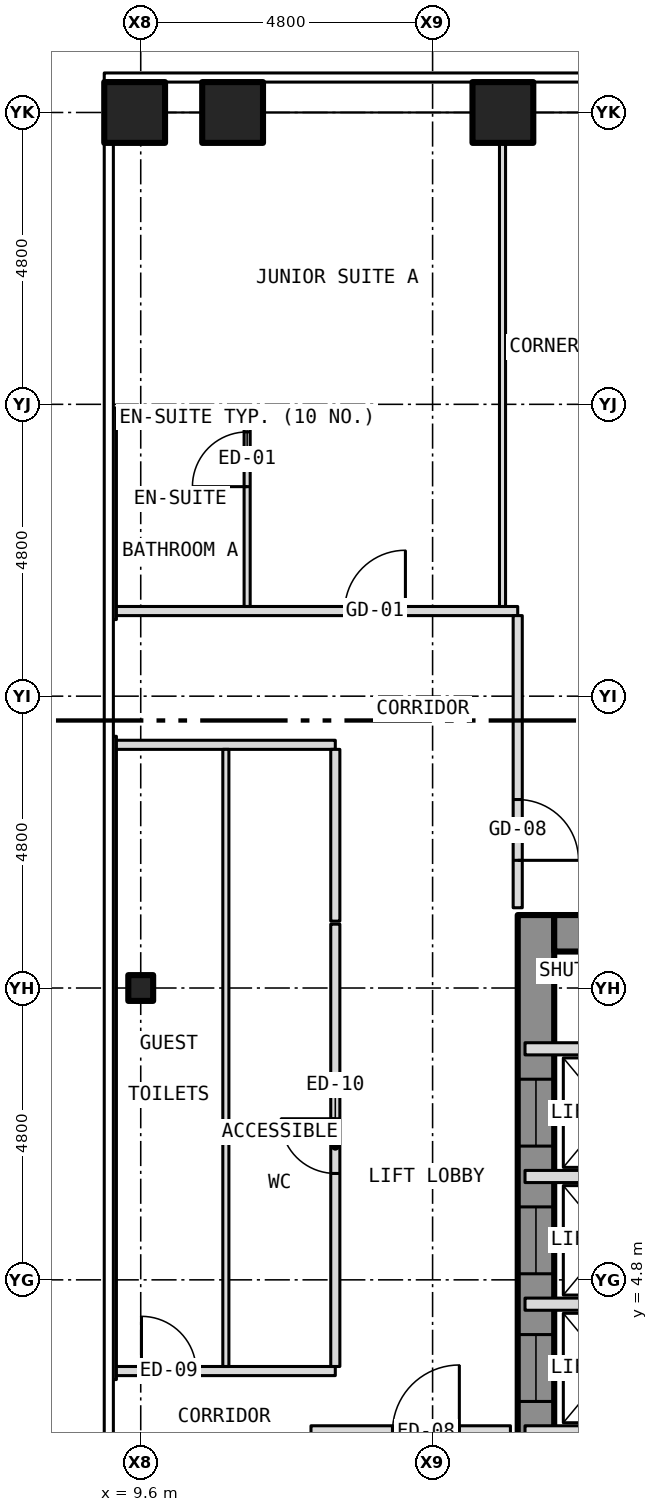
"""IFC4 building model, lengths in metres.
Left out: names, types, materials, properties, quantities, classifications, styles, units other than length and angle.
Written with IfcOpenShell. Run it as: python <this file> out.ifc"""

import sys

from ifc_helpers import new_model, si_unit, direction, frame, frame_2d, origin, origin_2d, place, context, subcontext, project, spatial, rectangle, hollow_rectangle, i_section, extrude, element, fill, save


model = new_model("IFC4")
c1 = context("Model", 3, precision=1e-05, world=origin(), true_north=direction((0.0, 1.0)))
c2 = subcontext(c1, "Body", "Model", "MODEL_VIEW")
j1 = project(units=[si_unit("LENGTHUNIT", "METRE"), si_unit("PLANEANGLEUNIT", "RADIAN")], contexts=[c1])
p1 = place(None, origin())
s1 = spatial("IfcSite", under=j1, at=p1, CompositionType="ELEMENT")
p2 = place(p1, origin())
s2 = spatial("IfcBuilding", under=s1, at=p2, CompositionType="ELEMENT")
p3 = place(p2, frame((0.0, 0.0, 67.0)))
s3 = spatial("IfcBuildingStorey", under=s2, at=p3, CompositionType="ELEMENT", Elevation=67.0)
for number, where, z_axis, x_axis in (
    (1, (11.111, 24.0, -0.15), (0.0, 0.0, 1.0), (1.0, 0.0, 0.0)),
    (2, (15.556, 24.0, -0.15), (0.0, 0.0, 1.0), (1.0, 0.0, 0.0)),
    (3, (9.5, 24.0, -0.15), (0.0, 0.0, 1.0), (1.0, 0.0, 0.0)),
):
    element("IfcColumn", number, at=place(p3, frame(where, z_axis=z_axis, x_axis=x_axis)), inside=s3, PredefinedType="COLUMN", context=c2, shape_type="SweptSolid", body=[
        extrude(hollow_rectangle(XDim=1.0, YDim=1.0, WallThickness=0.06, at=origin_2d()), origin(), (0.0, 0.0, 1.0), 3.5),
    ])
p4 = place(p3, frame((9.6, 9.6, -0.15), z_axis=(0.0, 0.0, 1.0), x_axis=(1.0, 0.0, 0.0)))
e4 = element("IfcColumn", 4, at=p4, inside=s3, PredefinedType="COLUMN", context=c2, shape_type="SweptSolid", body=[
    extrude(i_section(OverallWidth=0.409, OverallDepth=0.424, WebThickness=0.033, FlangeThickness=0.052, at=origin_2d()), origin(), (0.0, 0.0, 1.0), 3.5),
])
p5 = place(p3, frame((16.1, -10.8, 0.0), z_axis=(0.0, 0.0, 1.0), x_axis=(0.0, 1.0, 0.0)))
e5 = element("IfcWall", 5, at=p5, inside=s3, PredefinedType="SHEAR", context=c2, shape_type="SweptSolid", body=[
    extrude(rectangle(XDim=21.6, YDim=0.6, at=frame_2d((10.8, 0.0))), origin(), (0.0, 0.0, 1.0), 3.25),
])
p6 = place(p5, frame((9.4, 0.0, 0.0)))
e6 = element("IfcOpeningElement", 6, at=p6, cuts=e5, PredefinedType="OPENING", context=c2, shape_type="SweptSolid", body=[
    extrude(rectangle(XDim=1.1, YDim=2.1, at=frame_2d((0.55, 1.05))), frame((0.0, 0.312, 0.0), z_axis=(0.0, -1.0, 0.0), x_axis=(1.0, 0.0, 0.0)), (0.0, 0.0, 1.0), 0.624),
])
p7 = place(p5, frame((11.5, 0.0, 0.0)))
e7 = element("IfcOpeningElement", 7, at=p7, cuts=e5, PredefinedType="OPENING", context=c2, shape_type="SweptSolid", body=[
    extrude(rectangle(XDim=1.1, YDim=2.1, at=frame_2d((0.55, 1.05))), frame((0.0, 0.312, 0.0), z_axis=(0.0, -1.0, 0.0), x_axis=(1.0, 0.0, 0.0)), (0.0, 0.0, 1.0), 0.624),
])
p8 = place(p5, frame((13.6, 0.0, 0.0)))
e8 = element("IfcOpeningElement", 8, at=p8, cuts=e5, PredefinedType="OPENING", context=c2, shape_type="SweptSolid", body=[
    extrude(rectangle(XDim=1.1, YDim=2.1, at=frame_2d((0.55, 1.05))), frame((0.0, 0.312, 0.0), z_axis=(0.0, -1.0, 0.0), x_axis=(1.0, 0.0, 0.0)), (0.0, 0.0, 1.0), 0.624),
])
p9 = place(p5, frame((15.7, 0.0, 0.0)))
e9 = element("IfcOpeningElement", 9, at=p9, cuts=e5, PredefinedType="OPENING", context=c2, shape_type="SweptSolid", body=[
    extrude(rectangle(XDim=1.1, YDim=2.1, at=frame_2d((0.55, 1.05))), frame((0.0, 0.312, 0.0), z_axis=(0.0, -1.0, 0.0), x_axis=(1.0, 0.0, 0.0)), (0.0, 0.0, 1.0), 0.624),
])
p10 = place(p5, frame((17.8, 0.0, 0.0)))
e10 = element("IfcOpeningElement", 10, at=p10, cuts=e5, PredefinedType="OPENING", context=c2, shape_type="SweptSolid", body=[
    extrude(rectangle(XDim=1.1, YDim=2.1, at=frame_2d((0.55, 1.05))), frame((0.0, 0.312, 0.0), z_axis=(0.0, -1.0, 0.0), x_axis=(1.0, 0.0, 0.0)), (0.0, 0.0, 1.0), 0.624),
])
p11 = place(p5, frame((5.642, 0.0, 0.0)))
e11 = element("IfcOpeningElement", 11, at=p11, cuts=e5, PredefinedType="OPENING", context=c2, shape_type="SweptSolid", body=[
    extrude(rectangle(XDim=1.1, YDim=2.1, at=frame_2d((0.55, 1.05))), frame((0.0, 0.312, 0.0), z_axis=(0.0, -1.0, 0.0), x_axis=(1.0, 0.0, 0.0)), (0.0, 0.0, 1.0), 0.624),
])
p12 = place(p5, frame((7.5, 0.0, 0.0)))
e12 = element("IfcOpeningElement", 12, at=p12, cuts=e5, PredefinedType="OPENING", context=c2, shape_type="SweptSolid", body=[
    extrude(rectangle(XDim=1.1, YDim=2.1, at=frame_2d((0.55, 1.05))), frame((0.0, 0.312, 0.0), z_axis=(0.0, -1.0, 0.0), x_axis=(1.0, 0.0, 0.0)), (0.0, 0.0, 1.0), 0.624),
])
p13 = place(p3, frame((16.4, 10.5, 0.0), z_axis=(0.0, 0.0, 1.0), x_axis=(1.0, 0.0, 0.0)))
e13 = element("IfcWall", 13, at=p13, inside=s3, PredefinedType="SHEAR", context=c2, shape_type="SweptSolid", body=[
    extrude(rectangle(XDim=7.0, YDim=0.6, at=frame_2d((3.5, 0.0))), origin(), (0.0, 0.0, 1.0), 3.25),
])
p14 = place(p3, frame((12.4, 2.3, 0.0), z_axis=(0.0, 0.0, 1.0), x_axis=(1.0, 0.0, 0.0)))
e14 = element("IfcWall", 14, at=p14, inside=s3, PredefinedType="PARTITIONING", context=c2, shape_type="SweptSolid", body=[
    extrude(rectangle(XDim=3.28, YDim=0.2, at=frame_2d((1.64, 0.0))), origin(), (0.0, 0.0, 1.0), 3.35),
])
p15 = place(p14, frame((1.34, 0.0, 0.0)))
e15 = element("IfcOpeningElement", 15, at=p15, cuts=e14, PredefinedType="OPENING", context=c2, shape_type="SweptSolid", body=[
    extrude(rectangle(XDim=1.1, YDim=2.1, at=frame_2d((0.55, 1.05))), frame((0.0, 0.112, 0.0), z_axis=(0.0, -1.0, 0.0), x_axis=(1.0, 0.0, 0.0)), (0.0, 0.0, 1.0), 0.224),
])
p16 = place(p3, frame((15.92, 2.3, 0.0), z_axis=(0.0, 0.0, 1.0), x_axis=(1.0, 0.0, 0.0)))
e16 = element("IfcWall", 16, at=p16, inside=s3, PredefinedType="PARTITIONING", context=c2, shape_type="SweptSolid", body=[
    extrude(rectangle(XDim=2.88, YDim=0.2, at=frame_2d((1.44, 0.0))), origin(), (0.0, 0.0, 1.0), 3.25),
])
p17 = place(p3, frame((9.15, 3.3, 0.0), z_axis=(0.0, 0.0, 1.0), x_axis=(1.0, 0.0, 0.0)))
e17 = element("IfcWall", 17, at=p17, inside=s3, PredefinedType="PARTITIONING", context=c2, shape_type="SweptSolid", body=[
    extrude(rectangle(XDim=3.65, YDim=0.15, at=frame_2d((1.825, 0.0))), origin(), (0.0, 0.0, 1.0), 3.35),
])
p18 = place(p17, frame((0.462, 0.0, 0.0)))
e18 = element("IfcOpeningElement", 18, at=p18, cuts=e17, PredefinedType="OPENING", context=c2, shape_type="SweptSolid", body=[
    extrude(rectangle(XDim=0.9, YDim=2.1, at=frame_2d((0.45, 1.05))), frame((0.0, 0.087, 0.0), z_axis=(0.0, -1.0, 0.0), x_axis=(1.0, 0.0, 0.0)), (0.0, 0.0, 1.0), 0.174),
])
for number, where, z_axis, x_axis in (
    (19, (15.92, 4.4, 0.0), (0.0, 0.0, 1.0), (1.0, 0.0, 0.0)),
    (20, (15.92, 6.5, 0.0), (0.0, 0.0, 1.0), (1.0, 0.0, 0.0)),
    (21, (15.92, 8.6, 0.0), (0.0, 0.0, 1.0), (1.0, 0.0, 0.0)),
):
    element("IfcWall", number, at=place(p3, frame(where, z_axis=z_axis, x_axis=x_axis)), inside=s3, PredefinedType="PARTITIONING", context=c2, shape_type="SweptSolid", body=[
        extrude(rectangle(XDim=2.88, YDim=0.2, at=frame_2d((1.44, 0.0))), origin(), (0.0, 0.0, 1.0), 3.25),
    ])
p19 = place(p3, frame((9.15, 13.6, 0.0), z_axis=(0.0, 0.0, 1.0), x_axis=(1.0, 0.0, 0.0)))
e22 = element("IfcWall", 22, at=p19, inside=s3, PredefinedType="PARTITIONING", context=c2, shape_type="SweptSolid", body=[
    extrude(rectangle(XDim=3.65, YDim=0.15, at=frame_2d((1.825, 0.0))), origin(), (0.0, 0.0, 1.0), 3.35),
])
p20 = place(p3, frame((9.15, 15.8, 0.0), z_axis=(0.0, 0.0, 1.0), x_axis=(1.0, 0.0, 0.0)))
e23 = element("IfcWall", 23, at=p20, inside=s3, PredefinedType="PARTITIONING", context=c2, shape_type="SweptSolid", body=[
    extrude(rectangle(XDim=6.65, YDim=0.15, at=frame_2d((3.325, 0.0))), origin(), (0.0, 0.0, 1.0), 3.35),
])
p21 = place(p20, frame((3.803, 0.0, 0.0)))
e24 = element("IfcOpeningElement", 24, at=p21, cuts=e23, PredefinedType="OPENING", context=c2, shape_type="SweptSolid", body=[
    extrude(rectangle(XDim=1.0, YDim=2.1, at=frame_2d((0.5, 1.05))), frame((0.0, 0.087, 0.0), z_axis=(0.0, -1.0, 0.0), x_axis=(1.0, 0.0, 0.0)), (0.0, 0.0, 1.0), 0.174),
])
p22 = place(p3, frame((9.15, 19.0, 0.0), z_axis=(0.0, 0.0, 1.0), x_axis=(1.0, 0.0, 0.0)))
e25 = element("IfcWall", 25, at=p22, inside=s3, PredefinedType="PARTITIONING", context=c2, shape_type="SweptSolid", body=[
    extrude(rectangle(XDim=2.2, YDim=0.1, at=frame_2d((1.1, 0.0))), origin(), (0.0, 0.0, 1.0), 3.35),
])
p23 = place(p3, frame((9.15, 3.16, 0.0), z_axis=(0.0, 0.0, 1.0), x_axis=(0.0, 1.0, 0.0)))
e26 = element("IfcWall", 26, at=p23, inside=s3, PredefinedType="PARTITIONING", context=c2, shape_type="SweptSolid", body=[
    extrude(rectangle(XDim=10.58, YDim=0.1, at=frame_2d((5.29, 0.0))), origin(), (0.0, 0.0, 1.0), 2.733),
])
p24 = place(p3, frame((9.15, 15.66, 0.0), z_axis=(0.0, 0.0, 1.0), x_axis=(0.0, 1.0, 0.0)))
e27 = element("IfcWall", 27, at=p24, inside=s3, PredefinedType="PARTITIONING", context=c2, shape_type="SweptSolid", body=[
    extrude(rectangle(XDim=3.48, YDim=0.1, at=frame_2d((1.74, 0.0))), origin(), (0.0, 0.0, 1.0), 2.733),
])
p25 = place(p3, frame((11.0, 3.375, 0.0), z_axis=(0.0, 0.0, 1.0), x_axis=(0.0, 1.0, 0.0)))
e28 = element("IfcWall", 28, at=p25, inside=s3, PredefinedType="PARTITIONING", context=c2, shape_type="SweptSolid", body=[
    extrude(rectangle(XDim=10.15, YDim=0.1, at=frame_2d((5.075, 0.0))), origin(), (0.0, 0.0, 1.0), 3.35),
])
p26 = place(p3, frame((11.35, 15.875, 0.0), z_axis=(0.0, 0.0, 1.0), x_axis=(0.0, 1.0, 0.0)))
e29 = element("IfcWall", 29, at=p26, inside=s3, PredefinedType="PARTITIONING", context=c2, shape_type="SweptSolid", body=[
    extrude(rectangle(XDim=3.075, YDim=0.1, at=frame_2d((1.538, 0.0))), origin(), (0.0, 0.0, 1.0), 3.35),
])
p27 = place(p26, frame((1.971, 0.0, 0.0)))
e30 = element("IfcOpeningElement", 30, at=p27, cuts=e29, PredefinedType="OPENING", context=c2, shape_type="SweptSolid", body=[
    extrude(rectangle(XDim=0.9, YDim=2.1, at=frame_2d((0.45, 1.05))), frame((0.0, 0.062, 0.0), z_axis=(0.0, -1.0, 0.0), x_axis=(1.0, 0.0, 0.0)), (0.0, 0.0, 1.0), 0.124),
])
p28 = place(p3, frame((12.8, 3.375, 0.0), z_axis=(0.0, 0.0, 1.0), x_axis=(0.0, 1.0, 0.0)))
e31 = element("IfcWall", 31, at=p28, inside=s3, PredefinedType="PARTITIONING", context=c2, shape_type="SweptSolid", body=[
    extrude(rectangle(XDim=7.275, YDim=0.15, at=frame_2d((3.637, 0.0))), origin(), (0.0, 0.0, 1.0), 3.35),
])
p29 = place(p28, frame((3.175, 0.0, 0.0)))
e32 = element("IfcOpeningElement", 32, at=p29, cuts=e31, PredefinedType="OPENING", context=c2, shape_type="SweptSolid", body=[
    extrude(rectangle(XDim=0.9, YDim=2.1, at=frame_2d((0.45, 1.05))), frame((0.0, 0.087, 0.0), z_axis=(0.0, -1.0, 0.0), x_axis=(1.0, 0.0, 0.0)), (0.0, 0.0, 1.0), 0.174),
])
p30 = place(p3, frame((12.8, 10.7, 0.0), z_axis=(0.0, 0.0, 1.0), x_axis=(0.0, 1.0, 0.0)))
e33 = element("IfcWall", 33, at=p30, inside=s3, PredefinedType="PARTITIONING", context=c2, shape_type="SweptSolid", body=[
    extrude(rectangle(XDim=2.825, YDim=0.15, at=frame_2d((1.413, 0.0))), origin(), (0.0, 0.0, 1.0), 3.35),
])
p31 = place(p3, frame((15.55, 15.875, 0.0), z_axis=(0.0, 0.0, 1.0), x_axis=(0.0, 1.0, 0.0)))
e34 = element("IfcWall", 34, at=p31, inside=s3, PredefinedType="PARTITIONING", context=c2, shape_type="SweptSolid", body=[
    extrude(rectangle(XDim=8.005, YDim=0.1, at=frame_2d((4.002, 0.0))), origin(), (0.0, 0.0, 1.0), 3.35),
])
p32 = place(p3, frame((15.8, 10.92, 0.0), z_axis=(0.0, 0.0, 1.0), x_axis=(0.0, 1.0, 0.0)))
e35 = element("IfcWall", 35, at=p32, inside=s3, PredefinedType="PARTITIONING", context=c2, shape_type="SweptSolid", body=[
    extrude(rectangle(XDim=4.805, YDim=0.15, at=frame_2d((2.403, 0.0))), origin(), (0.0, 0.0, 1.0), 3.35),
])
p33 = place(p32, frame((0.78, 0.0, 0.0)))
e36 = element("IfcOpeningElement", 36, at=p33, cuts=e35, PredefinedType="OPENING", context=c2, shape_type="SweptSolid", body=[
    extrude(rectangle(XDim=1.0, YDim=2.1, at=frame_2d((0.5, 1.05))), frame((0.0, 0.087, 0.0), z_axis=(0.0, -1.0, 0.0), x_axis=(1.0, 0.0, 0.0)), (0.0, 0.0, 1.0), 0.174),
])
p34 = place(p8, origin())
e37 = element("IfcDoor", 37, at=p34, inside=s3, OperationType="SLIDING_TO_LEFT", PredefinedType="DOOR", context=c2, shape_type="SweptSolid", body=[
    extrude(rectangle(XDim=1.1, YDim=2.1, at=frame_2d((0.55, 1.05))), frame((0.0, 0.025, 0.0), z_axis=(0.0, -1.0, 0.0), x_axis=(1.0, 0.0, 0.0)), (0.0, 0.0, 1.0), 0.05),
])
fill(e8, e37)
p35 = place(p9, origin())
e38 = element("IfcDoor", 38, at=p35, inside=s3, OperationType="SLIDING_TO_LEFT", PredefinedType="DOOR", context=c2, shape_type="SweptSolid", body=[
    extrude(rectangle(XDim=1.1, YDim=2.1, at=frame_2d((0.55, 1.05))), frame((0.0, 0.025, 0.0), z_axis=(0.0, -1.0, 0.0), x_axis=(1.0, 0.0, 0.0)), (0.0, 0.0, 1.0), 0.05),
])
fill(e9, e38)
p36 = place(p10, origin())
e39 = element("IfcDoor", 39, at=p36, inside=s3, OperationType="SLIDING_TO_LEFT", PredefinedType="DOOR", context=c2, shape_type="SweptSolid", body=[
    extrude(rectangle(XDim=1.1, YDim=2.1, at=frame_2d((0.55, 1.05))), frame((0.0, 0.025, 0.0), z_axis=(0.0, -1.0, 0.0), x_axis=(1.0, 0.0, 0.0)), (0.0, 0.0, 1.0), 0.05),
])
fill(e10, e39)
p37 = place(p15, origin())
e40 = element("IfcDoor", 40, at=p37, inside=s3, OperationType="SINGLE_SWING_RIGHT", PredefinedType="DOOR", context=c2, shape_type="SweptSolid", body=[
    extrude(rectangle(XDim=1.1, YDim=2.1, at=frame_2d((0.55, 1.05))), frame((0.0, 0.025, 0.0), z_axis=(0.0, -1.0, 0.0), x_axis=(1.0, 0.0, 0.0)), (0.0, 0.0, 1.0), 0.05),
])
fill(e15, e40)
p38 = place(p21, origin())
e41 = element("IfcDoor", 41, at=p38, inside=s3, OperationType="SINGLE_SWING_RIGHT", PredefinedType="DOOR", context=c2, shape_type="SweptSolid", body=[
    extrude(rectangle(XDim=1.0, YDim=2.1, at=frame_2d((0.5, 1.05))), frame((0.0, 0.025, 0.0), z_axis=(0.0, -1.0, 0.0), x_axis=(1.0, 0.0, 0.0)), (0.0, 0.0, 1.0), 0.05),
])
fill(e24, e41)
p39 = place(p27, origin())
e42 = element("IfcDoor", 42, at=p39, inside=s3, OperationType="SINGLE_SWING_LEFT", PredefinedType="DOOR", context=c2, shape_type="SweptSolid", body=[
    extrude(rectangle(XDim=0.9, YDim=2.1, at=frame_2d((0.45, 1.05))), frame((0.0, 0.025, 0.0), z_axis=(0.0, -1.0, 0.0), x_axis=(1.0, 0.0, 0.0)), (0.0, 0.0, 1.0), 0.05),
])
fill(e30, e42)
p40 = place(p33, origin())
e43 = element("IfcDoor", 43, at=p40, inside=s3, OperationType="SINGLE_SWING_LEFT", PredefinedType="DOOR", context=c2, shape_type="SweptSolid", body=[
    extrude(rectangle(XDim=1.0, YDim=2.1, at=frame_2d((0.5, 1.05))), frame((0.0, 0.025, 0.0), z_axis=(0.0, -1.0, 0.0), x_axis=(1.0, 0.0, 0.0)), (0.0, 0.0, 1.0), 0.05),
])
fill(e36, e43)
p41 = place(p18, origin())
e44 = element("IfcDoor", 44, at=p41, inside=s3, OperationType="SINGLE_SWING_LEFT", PredefinedType="DOOR", context=c2, shape_type="SweptSolid", body=[
    extrude(rectangle(XDim=0.9, YDim=2.1, at=frame_2d((0.45, 1.05))), frame((0.0, 0.025, 0.0), z_axis=(0.0, -1.0, 0.0), x_axis=(1.0, 0.0, 0.0)), (0.0, 0.0, 1.0), 0.05),
])
fill(e18, e44)
p42 = place(p29, origin())
e45 = element("IfcDoor", 45, at=p42, inside=s3, OperationType="SINGLE_SWING_RIGHT", PredefinedType="DOOR", context=c2, shape_type="SweptSolid", body=[
    extrude(rectangle(XDim=0.9, YDim=2.1, at=frame_2d((0.45, 1.05))), frame((0.0, 0.025, 0.0), z_axis=(0.0, -1.0, 0.0), x_axis=(1.0, 0.0, 0.0)), (0.0, 0.0, 1.0), 0.05),
])
fill(e32, e45)
save(model, sys.argv[1])
